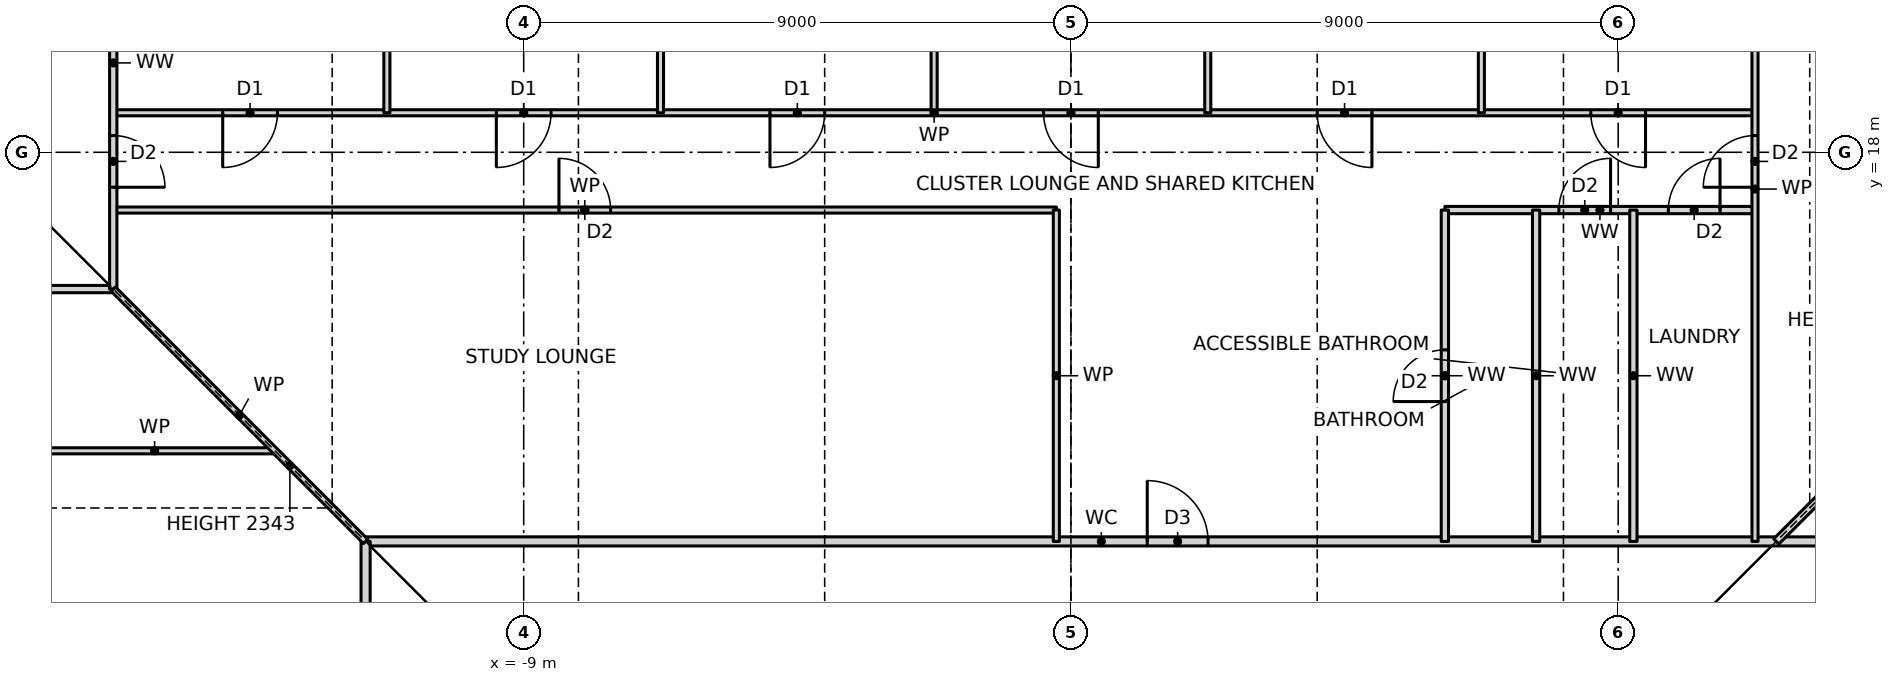
"""IFC4 building model, lengths in metres.
Left out: names, types, materials, properties, quantities, classifications, styles, units other than length and angle.
Written with IfcOpenShell. Run it as: python <this file> out.ifc"""

import sys

from ifc_helpers import new_model, si_unit, direction, frame, frame_2d, origin, place, context, subcontext, project, spatial, rectangle, extrude, element, fill, save


model = new_model("IFC4")
c1 = context("Model", 3, precision=1e-05, world=origin(), true_north=direction((0.0, 1.0)))
c2 = subcontext(c1, "Body", "Model", "MODEL_VIEW")
j1 = project(units=[si_unit("LENGTHUNIT", "METRE"), si_unit("PLANEANGLEUNIT", "RADIAN")], contexts=[c1])
p1 = place(None, origin())
s1 = spatial("IfcSite", under=j1, at=p1, CompositionType="ELEMENT")
p2 = place(p1, origin())
s2 = spatial("IfcBuilding", under=s1, at=p2, CompositionType="ELEMENT")
p3 = place(p2, frame((0.0, 0.0, 25.5)))
s3 = spatial("IfcBuildingStorey", under=s2, at=p3, CompositionType="ELEMENT", Elevation=25.5)
p4 = place(p3, frame((-11.6, 11.6, 0.0), z_axis=(0.0, 0.0, 1.0), x_axis=(1.0, 0.0, 0.0)))
e1 = element("IfcWall", 1, at=p4, inside=s3, PredefinedType="PARTITIONING", context=c2, shape_type="SweptSolid", body=[
    extrude(rectangle(XDim=24.2, YDim=0.15, at=frame_2d((12.1, 0.0))), origin(), (0.0, 0.0, 1.0), 3.27),
])
p5 = place(p4, frame((12.855, 0.0, 0.0)))
e2 = element("IfcOpeningElement", 2, at=p5, cuts=e1, PredefinedType="OPENING", context=c2, shape_type="SweptSolid", body=[
    extrude(rectangle(XDim=1.0, YDim=2.1, at=frame_2d((0.5, 1.05))), frame((0.0, 0.085, 0.0), z_axis=(0.0, -1.0, 0.0), x_axis=(1.0, 0.0, 0.0)), (0.0, 0.0, 1.0), 0.17),
])
p6 = place(p3, frame((-17.05, 13.09, 0.0), z_axis=(0.0, 0.0, 1.0), x_axis=(1.0, 0.0, 0.0)))
e3 = element("IfcWall", 3, at=p6, inside=s3, PredefinedType="PARTITIONING", context=c2, shape_type="SweptSolid", body=[
    extrude(rectangle(XDim=3.96, YDim=0.1, at=frame_2d((1.98, 0.0))), origin(), (0.0, 0.0, 1.0), 3.27),
])
p7 = place(p3, frame((-23.19, 15.75, 0.0), z_axis=(0.0, 0.0, 1.0), x_axis=(1.0, 0.0, 0.0)))
e4 = element("IfcWall", 4, at=p7, inside=s3, PredefinedType="PARTITIONING", context=c2, shape_type="SweptSolid", body=[
    extrude(rectangle(XDim=7.44, YDim=0.12, at=frame_2d((3.72, 0.0))), origin(), (0.0, 0.0, 1.0), 3.27),
])
p8 = place(p3, frame((-15.75, 17.05, 0.0), z_axis=(0.0, 0.0, 1.0), x_axis=(1.0, 0.0, 0.0)))
e5 = element("IfcWall", 5, at=p8, inside=s3, PredefinedType="PARTITIONING", context=c2, shape_type="SweptSolid", body=[
    extrude(rectangle(XDim=15.51, YDim=0.1, at=frame_2d((7.755, 0.0))), origin(), (0.0, 0.0, 1.0), 3.27),
])
p9 = place(p8, frame((7.33, 0.0, 0.0)))
e6 = element("IfcOpeningElement", 6, at=p9, cuts=e5, PredefinedType="OPENING", context=c2, shape_type="SweptSolid", body=[
    extrude(rectangle(XDim=0.85, YDim=2.1, at=frame_2d((0.425, 1.05))), frame((0.0, 0.06, 0.0), z_axis=(0.0, -1.0, 0.0), x_axis=(1.0, 0.0, 0.0)), (0.0, 0.0, 1.0), 0.12),
])
p10 = place(p3, frame((6.15, 17.05, 0.0), z_axis=(0.0, 0.0, 1.0), x_axis=(1.0, 0.0, 0.0)))
e7 = element("IfcWall", 7, at=p10, inside=s3, PredefinedType="PARTITIONING", context=c2, shape_type="SweptSolid", body=[
    extrude(rectangle(XDim=5.1, YDim=0.12, at=frame_2d((2.55, 0.0))), origin(), (0.0, 0.0, 1.0), 3.27),
])
p11 = place(p10, frame((3.675, 0.0, 0.0)))
e8 = element("IfcOpeningElement", 8, at=p11, cuts=e7, PredefinedType="OPENING", context=c2, shape_type="SweptSolid", body=[
    extrude(rectangle(XDim=0.85, YDim=2.1, at=frame_2d((0.425, 1.05))), frame((0.0, 0.07, 0.0), z_axis=(0.0, -1.0, 0.0), x_axis=(1.0, 0.0, 0.0)), (0.0, 0.0, 1.0), 0.14),
])
p12 = place(p10, frame((1.875, 0.0, 0.0)))
e9 = element("IfcOpeningElement", 9, at=p12, cuts=e7, PredefinedType="OPENING", context=c2, shape_type="SweptSolid", body=[
    extrude(rectangle(XDim=0.85, YDim=2.1, at=frame_2d((0.425, 1.05))), frame((0.0, 0.07, 0.0), z_axis=(0.0, -1.0, 0.0), x_axis=(1.0, 0.0, 0.0)), (0.0, 0.0, 1.0), 0.14),
])
p13 = place(p3, frame((-15.75, 18.65, 0.0), z_axis=(0.0, 0.0, 1.0), x_axis=(1.0, 0.0, 0.0)))
e10 = element("IfcWall", 10, at=p13, inside=s3, PredefinedType="PARTITIONING", context=c2, shape_type="SweptSolid", body=[
    extrude(rectangle(XDim=27.0, YDim=0.1, at=frame_2d((13.5, 0.0))), origin(), (0.0, 0.0, 1.0), 3.27),
])
p14 = place(p13, frame((24.3, 0.0, 0.0)))
e11 = element("IfcOpeningElement", 11, at=p14, cuts=e10, PredefinedType="OPENING", context=c2, shape_type="SweptSolid", body=[
    extrude(rectangle(XDim=0.9, YDim=2.1, at=frame_2d((0.45, 1.05))), frame((0.0, 0.06, 0.0), z_axis=(0.0, -1.0, 0.0), x_axis=(1.0, 0.0, 0.0)), (0.0, 0.0, 1.0), 0.12),
])
p15 = place(p13, frame((19.8, 0.0, 0.0)))
e12 = element("IfcOpeningElement", 12, at=p15, cuts=e10, PredefinedType="OPENING", context=c2, shape_type="SweptSolid", body=[
    extrude(rectangle(XDim=0.9, YDim=2.1, at=frame_2d((0.45, 1.05))), frame((0.0, 0.06, 0.0), z_axis=(0.0, -1.0, 0.0), x_axis=(1.0, 0.0, 0.0)), (0.0, 0.0, 1.0), 0.12),
])
p16 = place(p13, frame((15.3, 0.0, 0.0)))
e13 = element("IfcOpeningElement", 13, at=p16, cuts=e10, PredefinedType="OPENING", context=c2, shape_type="SweptSolid", body=[
    extrude(rectangle(XDim=0.9, YDim=2.1, at=frame_2d((0.45, 1.05))), frame((0.0, 0.06, 0.0), z_axis=(0.0, -1.0, 0.0), x_axis=(1.0, 0.0, 0.0)), (0.0, 0.0, 1.0), 0.12),
])
p17 = place(p13, frame((10.8, 0.0, 0.0)))
e14 = element("IfcOpeningElement", 14, at=p17, cuts=e10, PredefinedType="OPENING", context=c2, shape_type="SweptSolid", body=[
    extrude(rectangle(XDim=0.9, YDim=2.1, at=frame_2d((0.45, 1.05))), frame((0.0, 0.06, 0.0), z_axis=(0.0, -1.0, 0.0), x_axis=(1.0, 0.0, 0.0)), (0.0, 0.0, 1.0), 0.12),
])
p18 = place(p13, frame((6.3, 0.0, 0.0)))
e15 = element("IfcOpeningElement", 15, at=p18, cuts=e10, PredefinedType="OPENING", context=c2, shape_type="SweptSolid", body=[
    extrude(rectangle(XDim=0.9, YDim=2.1, at=frame_2d((0.45, 1.05))), frame((0.0, 0.06, 0.0), z_axis=(0.0, -1.0, 0.0), x_axis=(1.0, 0.0, 0.0)), (0.0, 0.0, 1.0), 0.12),
])
p19 = place(p13, frame((1.8, 0.0, 0.0)))
e16 = element("IfcOpeningElement", 16, at=p19, cuts=e10, PredefinedType="OPENING", context=c2, shape_type="SweptSolid", body=[
    extrude(rectangle(XDim=0.9, YDim=2.1, at=frame_2d((0.45, 1.05))), frame((0.0, 0.06, 0.0), z_axis=(0.0, -1.0, 0.0), x_axis=(1.0, 0.0, 0.0)), (0.0, 0.0, 1.0), 0.12),
])
p20 = place(p3, frame((11.6, 11.6, 0.0), z_axis=(0.0, 0.0, 1.0), x_axis=(0.707106781187, 0.707106781187, 0.0)))
e17 = element("IfcWall", 17, at=p20, inside=s3, PredefinedType="PARTITIONING", context=c2, shape_type="SweptSolid", body=[
    extrude(rectangle(XDim=5.869, YDim=0.12, at=frame_2d((2.935, 0.0))), origin(), (0.0, 0.0, 1.0), 2.343),
])
p21 = place(p3, frame((11.25, 11.6, 0.0), z_axis=(0.0, 0.0, 1.0), x_axis=(0.0, 1.0, 0.0)))
e18 = element("IfcWall", 18, at=p21, inside=s3, PredefinedType="PARTITIONING", context=c2, shape_type="SweptSolid", body=[
    extrude(rectangle(XDim=11.59, YDim=0.1, at=frame_2d((5.795, 0.0))), origin(), (0.0, 0.0, 1.0), 3.27),
])
p22 = place(p21, frame((5.825, 0.0, 0.0)))
e19 = element("IfcOpeningElement", 19, at=p22, cuts=e18, PredefinedType="OPENING", context=c2, shape_type="SweptSolid", body=[
    extrude(rectangle(XDim=0.85, YDim=2.1, at=frame_2d((0.425, 1.05))), frame((0.0, 0.06, 0.0), z_axis=(0.0, -1.0, 0.0), x_axis=(1.0, 0.0, 0.0)), (0.0, 0.0, 1.0), 0.12),
])
for number, where, z_axis, x_axis in (
    (20, (9.25, 11.6, 0.0), (0.0, 0.0, 1.0), (0.0, 1.0, 0.0)),
    (21, (7.65, 11.6, 0.0), (0.0, 0.0, 1.0), (0.0, 1.0, 0.0)),
):
    element("IfcWall", number, at=place(p3, frame(where, z_axis=z_axis, x_axis=x_axis)), inside=s3, PredefinedType="PARTITIONING", context=c2, shape_type="SweptSolid", body=[
        extrude(rectangle(XDim=5.45, YDim=0.12, at=frame_2d((2.725, 0.0))), origin(), (0.0, 0.0, 1.0), 3.27),
    ])
p23 = place(p3, frame((6.75, 18.65, 0.0), z_axis=(0.0, 0.0, 1.0), x_axis=(0.0, 1.0, 0.0)))
e22 = element("IfcWall", 22, at=p23, inside=s3, PredefinedType="PARTITIONING", context=c2, shape_type="SweptSolid", body=[
    extrude(rectangle(XDim=4.54, YDim=0.1, at=frame_2d((2.27, 0.0))), origin(), (0.0, 0.0, 1.0), 3.27),
])
p24 = place(p3, frame((6.15, 11.6, 0.0), z_axis=(0.0, 0.0, 1.0), x_axis=(0.0, 1.0, 0.0)))
e23 = element("IfcWall", 23, at=p24, inside=s3, PredefinedType="PARTITIONING", context=c2, shape_type="SweptSolid", body=[
    extrude(rectangle(XDim=5.45, YDim=0.12, at=frame_2d((2.725, 0.0))), origin(), (0.0, 0.0, 1.0), 3.27),
])
p25 = place(p24, frame((2.3, 0.0, 0.0)))
e24 = element("IfcOpeningElement", 24, at=p25, cuts=e23, PredefinedType="OPENING", context=c2, shape_type="SweptSolid", body=[
    extrude(rectangle(XDim=0.85, YDim=2.1, at=frame_2d((0.425, 1.05))), frame((0.0, 0.07, 0.0), z_axis=(0.0, -1.0, 0.0), x_axis=(1.0, 0.0, 0.0)), (0.0, 0.0, 1.0), 0.14),
])
p26 = place(p3, frame((2.25, 18.65, 0.0), z_axis=(0.0, 0.0, 1.0), x_axis=(0.0, 1.0, 0.0)))
e25 = element("IfcWall", 25, at=p26, inside=s3, PredefinedType="PARTITIONING", context=c2, shape_type="SweptSolid", body=[
    extrude(rectangle(XDim=4.54, YDim=0.1, at=frame_2d((2.27, 0.0))), origin(), (0.0, 0.0, 1.0), 3.27),
])
p27 = place(p3, frame((-0.24, 11.6, 0.0), z_axis=(0.0, 0.0, 1.0), x_axis=(0.0, 1.0, 0.0)))
e26 = element("IfcWall", 26, at=p27, inside=s3, PredefinedType="PARTITIONING", context=c2, shape_type="SweptSolid", body=[
    extrude(rectangle(XDim=5.45, YDim=0.1, at=frame_2d((2.725, 0.0))), origin(), (0.0, 0.0, 1.0), 3.27),
])
for number, where, z_axis, x_axis in (
    (27, (-2.25, 18.65, 0.0), (0.0, 0.0, 1.0), (0.0, 1.0, 0.0)),
    (28, (-6.75, 18.65, 0.0), (0.0, 0.0, 1.0), (0.0, 1.0, 0.0)),
    (29, (-11.25, 18.65, 0.0), (0.0, 0.0, 1.0), (0.0, 1.0, 0.0)),
):
    element("IfcWall", number, at=place(p3, frame(where, z_axis=z_axis, x_axis=x_axis)), inside=s3, PredefinedType="PARTITIONING", context=c2, shape_type="SweptSolid", body=[
        extrude(rectangle(XDim=4.54, YDim=0.1, at=frame_2d((2.27, 0.0))), origin(), (0.0, 0.0, 1.0), 3.27),
    ])
p28 = place(p3, frame((-11.6, -11.6, 0.0), z_axis=(0.0, 0.0, 1.0), x_axis=(0.0, 1.0, 0.0)))
e30 = element("IfcWall", 30, at=p28, inside=s3, PredefinedType="PARTITIONING", context=c2, shape_type="SweptSolid", body=[
    extrude(rectangle(XDim=23.2, YDim=0.15, at=frame_2d((11.6, 0.0))), origin(), (0.0, 0.0, 1.0), 3.27),
])
p29 = place(p28, frame((1.65, 0.0, 0.0)))
e31 = element("IfcOpeningElement", 31, at=p29, cuts=e30, PredefinedType="OPENING", context=c2, shape_type="SweptSolid", body=[
    extrude(rectangle(XDim=1.0, YDim=2.1, at=frame_2d((0.5, 1.05))), frame((0.0, 0.085, 0.0), z_axis=(0.0, -1.0, 0.0), x_axis=(1.0, 0.0, 0.0)), (0.0, 0.0, 1.0), 0.17),
])
p30 = place(p3, frame((-15.75, 15.75, 0.0), z_axis=(0.0, 0.0, 1.0), x_axis=(0.0, 1.0, 0.0)))
e32 = element("IfcWall", 32, at=p30, inside=s3, PredefinedType="PARTITIONING", context=c2, shape_type="SweptSolid", body=[
    extrude(rectangle(XDim=7.44, YDim=0.12, at=frame_2d((3.72, 0.0))), origin(), (0.0, 0.0, 1.0), 3.27),
])
p31 = place(p30, frame((1.675, 0.0, 0.0)))
e33 = element("IfcOpeningElement", 33, at=p31, cuts=e32, PredefinedType="OPENING", context=c2, shape_type="SweptSolid", body=[
    extrude(rectangle(XDim=0.85, YDim=2.1, at=frame_2d((0.425, 1.05))), frame((0.0, 0.07, 0.0), z_axis=(0.0, -1.0, 0.0), x_axis=(1.0, 0.0, 0.0)), (0.0, 0.0, 1.0), 0.14),
])
p32 = place(p3, frame((-11.6, 11.6, 0.0), z_axis=(0.0, 0.0, 1.0), x_axis=(-0.707106781187, 0.707106781187, 0.0)))
e34 = element("IfcWall", 34, at=p32, inside=s3, PredefinedType="PARTITIONING", context=c2, shape_type="SweptSolid", body=[
    extrude(rectangle(XDim=5.869, YDim=0.1, at=frame_2d((2.935, 0.0))), origin(), (0.0, 0.0, 1.0), 2.343),
])
p33 = place(p22, origin())
e35 = element("IfcDoor", 35, at=p33, inside=s3, OperationType="SINGLE_SWING_LEFT", PredefinedType="DOOR", context=c2, shape_type="SweptSolid", body=[
    extrude(rectangle(XDim=0.85, YDim=2.1, at=frame_2d((0.425, 1.05))), frame((0.0, 0.025, 0.0), z_axis=(0.0, -1.0, 0.0), x_axis=(1.0, 0.0, 0.0)), (0.0, 0.0, 1.0), 0.05),
])
fill(e19, e35)
p34 = place(p14, frame((0.9, 0.0, 0.0), z_axis=(0.0, 0.0, 1.0), x_axis=(-1.0, 0.0, 0.0)))
e36 = element("IfcDoor", 36, at=p34, inside=s3, OperationType="SINGLE_SWING_LEFT", PredefinedType="DOOR", context=c2, shape_type="SweptSolid", body=[
    extrude(rectangle(XDim=0.9, YDim=2.1, at=frame_2d((0.45, 1.05))), frame((0.0, 0.025, 0.0), z_axis=(0.0, -1.0, 0.0), x_axis=(1.0, 0.0, 0.0)), (0.0, 0.0, 1.0), 0.05),
])
fill(e11, e36)
p35 = place(p15, frame((0.9, 0.0, 0.0), z_axis=(0.0, 0.0, 1.0), x_axis=(-1.0, 0.0, 0.0)))
e37 = element("IfcDoor", 37, at=p35, inside=s3, OperationType="SINGLE_SWING_LEFT", PredefinedType="DOOR", context=c2, shape_type="SweptSolid", body=[
    extrude(rectangle(XDim=0.9, YDim=2.1, at=frame_2d((0.45, 1.05))), frame((0.0, 0.025, 0.0), z_axis=(0.0, -1.0, 0.0), x_axis=(1.0, 0.0, 0.0)), (0.0, 0.0, 1.0), 0.05),
])
fill(e12, e37)
p36 = place(p16, frame((0.9, 0.0, 0.0), z_axis=(0.0, 0.0, 1.0), x_axis=(-1.0, 0.0, 0.0)))
e38 = element("IfcDoor", 38, at=p36, inside=s3, OperationType="SINGLE_SWING_LEFT", PredefinedType="DOOR", context=c2, shape_type="SweptSolid", body=[
    extrude(rectangle(XDim=0.9, YDim=2.1, at=frame_2d((0.45, 1.05))), frame((0.0, 0.025, 0.0), z_axis=(0.0, -1.0, 0.0), x_axis=(1.0, 0.0, 0.0)), (0.0, 0.0, 1.0), 0.05),
])
fill(e13, e38)
p37 = place(p17, frame((0.9, 0.0, 0.0), z_axis=(0.0, 0.0, 1.0), x_axis=(-1.0, 0.0, 0.0)))
e39 = element("IfcDoor", 39, at=p37, inside=s3, OperationType="SINGLE_SWING_RIGHT", PredefinedType="DOOR", context=c2, shape_type="SweptSolid", body=[
    extrude(rectangle(XDim=0.9, YDim=2.1, at=frame_2d((0.45, 1.05))), frame((0.0, 0.025, 0.0), z_axis=(0.0, -1.0, 0.0), x_axis=(1.0, 0.0, 0.0)), (0.0, 0.0, 1.0), 0.05),
])
fill(e14, e39)
p38 = place(p18, frame((0.9, 0.0, 0.0), z_axis=(0.0, 0.0, 1.0), x_axis=(-1.0, 0.0, 0.0)))
e40 = element("IfcDoor", 40, at=p38, inside=s3, OperationType="SINGLE_SWING_RIGHT", PredefinedType="DOOR", context=c2, shape_type="SweptSolid", body=[
    extrude(rectangle(XDim=0.9, YDim=2.1, at=frame_2d((0.45, 1.05))), frame((0.0, 0.025, 0.0), z_axis=(0.0, -1.0, 0.0), x_axis=(1.0, 0.0, 0.0)), (0.0, 0.0, 1.0), 0.05),
])
fill(e15, e40)
p39 = place(p19, frame((0.9, 0.0, 0.0), z_axis=(0.0, 0.0, 1.0), x_axis=(-1.0, 0.0, 0.0)))
e41 = element("IfcDoor", 41, at=p39, inside=s3, OperationType="SINGLE_SWING_RIGHT", PredefinedType="DOOR", context=c2, shape_type="SweptSolid", body=[
    extrude(rectangle(XDim=0.9, YDim=2.1, at=frame_2d((0.45, 1.05))), frame((0.0, 0.025, 0.0), z_axis=(0.0, -1.0, 0.0), x_axis=(1.0, 0.0, 0.0)), (0.0, 0.0, 1.0), 0.05),
])
fill(e16, e41)
p40 = place(p5, origin())
e42 = element("IfcDoor", 42, at=p40, inside=s3, OperationType="SINGLE_SWING_LEFT", PredefinedType="DOOR", context=c2, shape_type="SweptSolid", body=[
    extrude(rectangle(XDim=1.0, YDim=2.1, at=frame_2d((0.5, 1.05))), frame((0.0, 0.025, 0.0), z_axis=(0.0, -1.0, 0.0), x_axis=(1.0, 0.0, 0.0)), (0.0, 0.0, 1.0), 0.05),
])
fill(e2, e42)
p41 = place(p11, origin())
e43 = element("IfcDoor", 43, at=p41, inside=s3, OperationType="SINGLE_SWING_RIGHT", PredefinedType="DOOR", context=c2, shape_type="SweptSolid", body=[
    extrude(rectangle(XDim=0.85, YDim=2.1, at=frame_2d((0.425, 1.05))), frame((0.0, 0.025, 0.0), z_axis=(0.0, -1.0, 0.0), x_axis=(1.0, 0.0, 0.0)), (0.0, 0.0, 1.0), 0.05),
])
fill(e8, e43)
p42 = place(p12, origin())
e44 = element("IfcDoor", 44, at=p42, inside=s3, OperationType="SINGLE_SWING_RIGHT", PredefinedType="DOOR", context=c2, shape_type="SweptSolid", body=[
    extrude(rectangle(XDim=0.85, YDim=2.1, at=frame_2d((0.425, 1.05))), frame((0.0, 0.025, 0.0), z_axis=(0.0, -1.0, 0.0), x_axis=(1.0, 0.0, 0.0)), (0.0, 0.0, 1.0), 0.05),
])
fill(e9, e44)
p43 = place(p25, origin())
e45 = element("IfcDoor", 45, at=p43, inside=s3, OperationType="SINGLE_SWING_LEFT", PredefinedType="DOOR", context=c2, shape_type="SweptSolid", body=[
    extrude(rectangle(XDim=0.85, YDim=2.1, at=frame_2d((0.425, 1.05))), frame((0.0, 0.025, 0.0), z_axis=(0.0, -1.0, 0.0), x_axis=(1.0, 0.0, 0.0)), (0.0, 0.0, 1.0), 0.05),
])
fill(e24, e45)
p44 = place(p9, origin())
e46 = element("IfcDoor", 46, at=p44, inside=s3, OperationType="SINGLE_SWING_LEFT", PredefinedType="DOOR", context=c2, shape_type="SweptSolid", body=[
    extrude(rectangle(XDim=0.85, YDim=2.1, at=frame_2d((0.425, 1.05))), frame((0.0, 0.025, 0.0), z_axis=(0.0, -1.0, 0.0), x_axis=(1.0, 0.0, 0.0)), (0.0, 0.0, 1.0), 0.05),
])
fill(e6, e46)
p45 = place(p31, frame((0.85, 0.0, 0.0), z_axis=(0.0, 0.0, 1.0), x_axis=(-1.0, 0.0, 0.0)))
e47 = element("IfcDoor", 47, at=p45, inside=s3, OperationType="SINGLE_SWING_RIGHT", PredefinedType="DOOR", context=c2, shape_type="SweptSolid", body=[
    extrude(rectangle(XDim=0.85, YDim=2.1, at=frame_2d((0.425, 1.05))), frame((0.0, 0.025, 0.0), z_axis=(0.0, -1.0, 0.0), x_axis=(1.0, 0.0, 0.0)), (0.0, 0.0, 1.0), 0.05),
])
fill(e33, e47)
save(model, sys.argv[1])
